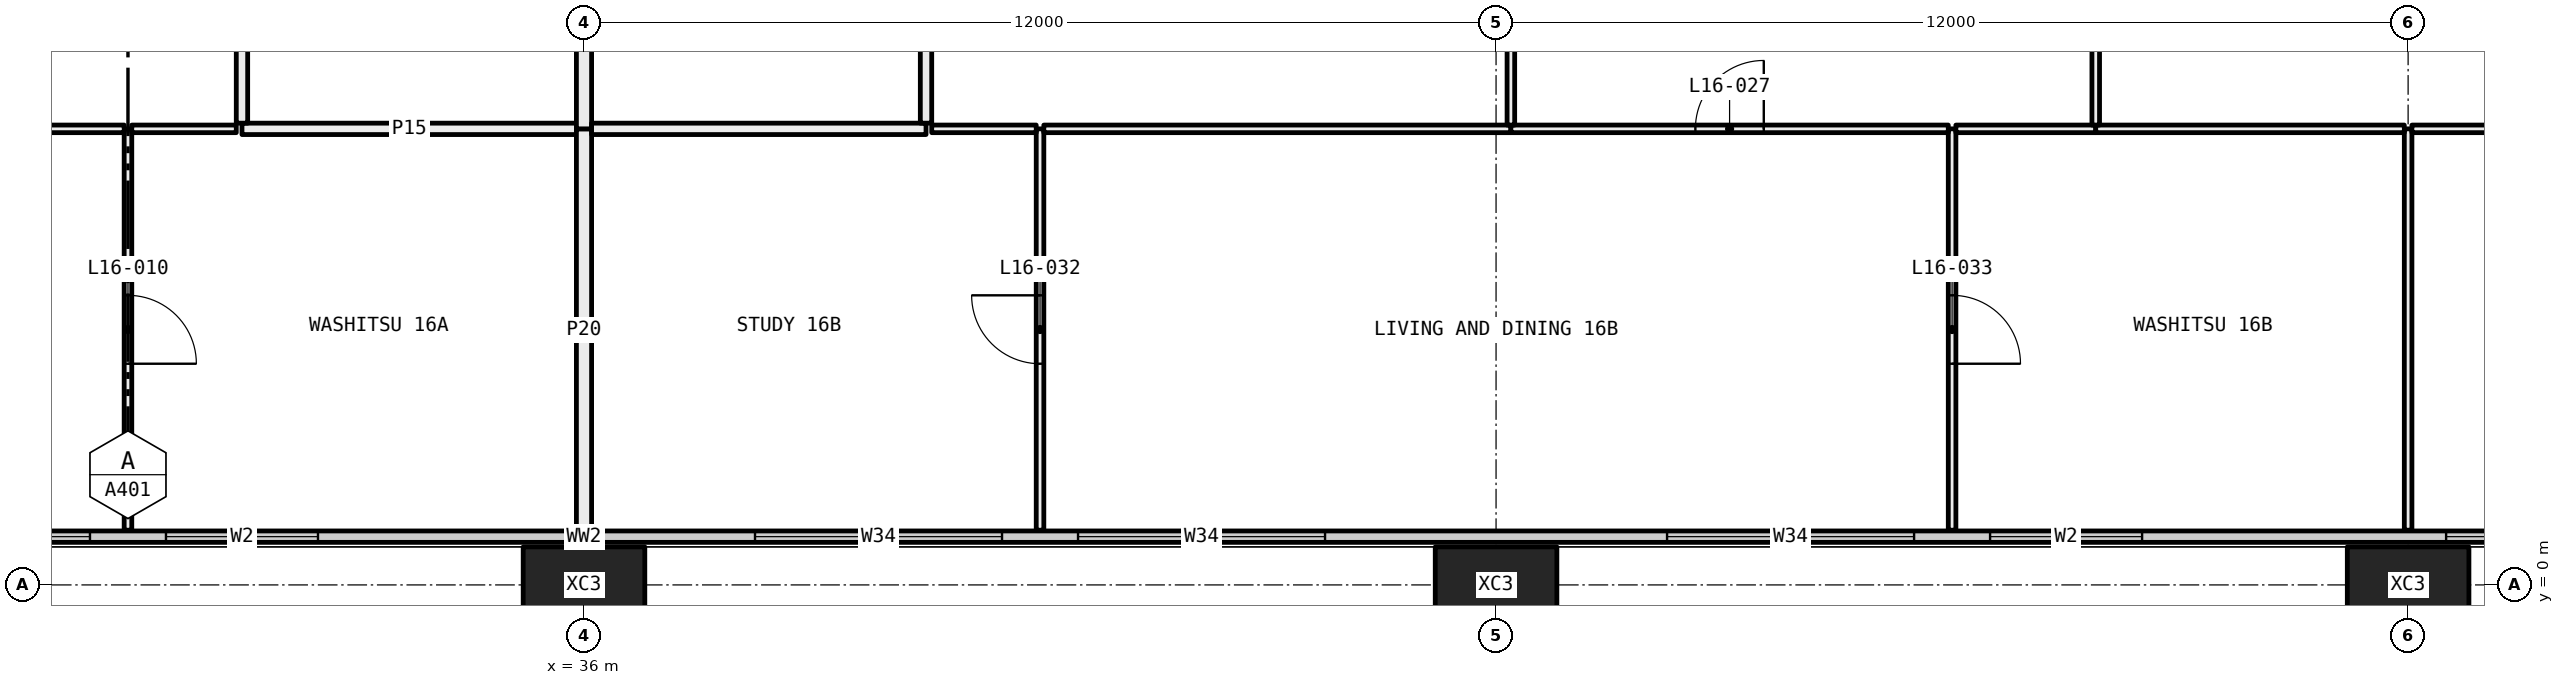
"""IFC4 building model, lengths in metres.
Left out: names, types, materials, properties, quantities, classifications, styles, units other than length and angle.
Written with IfcOpenShell. Run it as: python <this file> out.ifc"""

import sys

from ifc_helpers import new_model, si_unit, direction, frame, frame_2d, origin, origin_2d, place, context, subcontext, project, spatial, rectangle, hollow_rectangle, extrude, element, fill, save


model = new_model("IFC4")
c1 = context("Model", 3, precision=1e-05, world=origin(), true_north=direction((0.0, 1.0)))
c2 = subcontext(c1, "Body", "Model", "MODEL_VIEW")
j1 = project(units=[si_unit("LENGTHUNIT", "METRE"), si_unit("PLANEANGLEUNIT", "RADIAN")], contexts=[c1])
p1 = place(None, origin())
s1 = spatial("IfcSite", under=j1, at=p1, CompositionType="ELEMENT")
p2 = place(p1, origin())
s2 = spatial("IfcBuilding", under=s1, at=p2, CompositionType="ELEMENT")
p3 = place(p2, frame((0.0, 0.0, 67.95)))
s3 = spatial("IfcBuildingStorey", under=s2, at=p3, CompositionType="ELEMENT", Elevation=67.95)
for number, where, z_axis, x_axis in (
    (1, (36.0, 0.0, -0.4), (0.0, 0.0, 1.0), (1.0, 0.0, 0.0)),
    (2, (48.0, 0.0, -0.4), (0.0, 0.0, 1.0), (1.0, 0.0, 0.0)),
    (3, (60.0, 0.0, -0.4), (0.0, 0.0, 1.0), (1.0, 0.0, 0.0)),
):
    element("IfcColumn", number, at=place(p3, frame(where, z_axis=z_axis, x_axis=x_axis)), inside=s3, PredefinedType="COLUMN", context=c2, shape_type="SweptSolid", body=[
        extrude(hollow_rectangle(XDim=1.6, YDim=1.0, WallThickness=0.065, at=origin_2d()), origin(), (0.0, 0.0, 1.0), 3.45),
    ])
p4 = place(p3, frame((6.56, 0.635, 0.0), z_axis=(0.0, 0.0, 1.0), x_axis=(1.0, 0.0, 0.0)))
e4 = element("IfcWall", 4, at=p4, inside=s3, PredefinedType="ELEMENTEDWALL", context=c2, shape_type="SweptSolid", body=[
    extrude(rectangle(XDim=58.88, YDim=0.15, at=frame_2d((29.44, 0.0))), origin(), (0.0, 0.0, 1.0), 3.05),
])
p5 = place(p4, frame((0.44, 0.0, 0.45)))
e5 = element("IfcOpeningElement", 5, at=p5, cuts=e4, PredefinedType="OPENING", context=c2, shape_type="SweptSolid", body=[
    extrude(rectangle(XDim=4.5, YDim=2.55, at=frame_2d((2.25, 1.275))), frame((0.0, 0.085, 0.0), z_axis=(0.0, -1.0, 0.0), x_axis=(1.0, 0.0, 0.0)), (0.0, 0.0, 1.0), 0.17),
])
p6 = place(p4, frame((7.69, 0.0, 0.45)))
e6 = element("IfcOpeningElement", 6, at=p6, cuts=e4, PredefinedType="OPENING", context=c2, shape_type="SweptSolid", body=[
    extrude(rectangle(XDim=3.25, YDim=2.55, at=frame_2d((1.625, 1.275))), frame((0.0, 0.085, 0.0), z_axis=(0.0, -1.0, 0.0), x_axis=(1.0, 0.0, 0.0)), (0.0, 0.0, 1.0), 0.17),
])
p7 = place(p4, frame((11.94, 0.0, 0.45)))
e7 = element("IfcOpeningElement", 7, at=p7, cuts=e4, PredefinedType="OPENING", context=c2, shape_type="SweptSolid", body=[
    extrude(rectangle(XDim=3.25, YDim=2.55, at=frame_2d((1.625, 1.275))), frame((0.0, 0.085, 0.0), z_axis=(0.0, -1.0, 0.0), x_axis=(1.0, 0.0, 0.0)), (0.0, 0.0, 1.0), 0.17),
])
p8 = place(p4, frame((19.69, 0.0, 0.45)))
e8 = element("IfcOpeningElement", 8, at=p8, cuts=e4, PredefinedType="OPENING", context=c2, shape_type="SweptSolid", body=[
    extrude(rectangle(XDim=3.25, YDim=2.55, at=frame_2d((1.625, 1.275))), frame((0.0, 0.085, 0.0), z_axis=(0.0, -1.0, 0.0), x_axis=(1.0, 0.0, 0.0)), (0.0, 0.0, 1.0), 0.17),
])
p9 = place(p4, frame((23.94, 0.0, 0.45)))
e9 = element("IfcOpeningElement", 9, at=p9, cuts=e4, PredefinedType="OPENING", context=c2, shape_type="SweptSolid", body=[
    extrude(rectangle(XDim=2.0, YDim=2.55, at=frame_2d((1.0, 1.275))), frame((0.0, 0.085, 0.0), z_axis=(0.0, -1.0, 0.0), x_axis=(1.0, 0.0, 0.0)), (0.0, 0.0, 1.0), 0.17),
])
p10 = place(p4, frame((31.69, 0.0, 0.45)))
e10 = element("IfcOpeningElement", 10, at=p10, cuts=e4, PredefinedType="OPENING", context=c2, shape_type="SweptSolid", body=[
    extrude(rectangle(XDim=3.25, YDim=2.55, at=frame_2d((1.625, 1.275))), frame((0.0, 0.085, 0.0), z_axis=(0.0, -1.0, 0.0), x_axis=(1.0, 0.0, 0.0)), (0.0, 0.0, 1.0), 0.17),
])
p11 = place(p4, frame((35.94, 0.0, 0.45)))
e11 = element("IfcOpeningElement", 11, at=p11, cuts=e4, PredefinedType="OPENING", context=c2, shape_type="SweptSolid", body=[
    extrude(rectangle(XDim=3.25, YDim=2.55, at=frame_2d((1.625, 1.275))), frame((0.0, 0.085, 0.0), z_axis=(0.0, -1.0, 0.0), x_axis=(1.0, 0.0, 0.0)), (0.0, 0.0, 1.0), 0.17),
])
p12 = place(p4, frame((43.69, 0.0, 0.45)))
e12 = element("IfcOpeningElement", 12, at=p12, cuts=e4, PredefinedType="OPENING", context=c2, shape_type="SweptSolid", body=[
    extrude(rectangle(XDim=3.25, YDim=2.55, at=frame_2d((1.625, 1.275))), frame((0.0, 0.085, 0.0), z_axis=(0.0, -1.0, 0.0), x_axis=(1.0, 0.0, 0.0)), (0.0, 0.0, 1.0), 0.17),
])
p13 = place(p4, frame((47.94, 0.0, 0.45)))
e13 = element("IfcOpeningElement", 13, at=p13, cuts=e4, PredefinedType="OPENING", context=c2, shape_type="SweptSolid", body=[
    extrude(rectangle(XDim=2.0, YDim=2.55, at=frame_2d((1.0, 1.275))), frame((0.0, 0.085, 0.0), z_axis=(0.0, -1.0, 0.0), x_axis=(1.0, 0.0, 0.0)), (0.0, 0.0, 1.0), 0.17),
])
p14 = place(p4, frame((53.94, 0.0, 0.45)))
e14 = element("IfcOpeningElement", 14, at=p14, cuts=e4, PredefinedType="OPENING", context=c2, shape_type="SweptSolid", body=[
    extrude(rectangle(XDim=4.5, YDim=2.55, at=frame_2d((2.25, 1.275))), frame((0.0, 0.085, 0.0), z_axis=(0.0, -1.0, 0.0), x_axis=(1.0, 0.0, 0.0)), (0.0, 0.0, 1.0), 0.17),
])
p15 = place(p3, frame((30.0, 0.72, 0.0), z_axis=(0.0, 0.0, 1.0), x_axis=(0.0, 1.0, 0.0)))
e15 = element("IfcWall", 15, at=p15, inside=s3, PredefinedType="PARTITIONING", context=c2, shape_type="SweptSolid", body=[
    extrude(rectangle(XDim=5.28, YDim=0.1, at=frame_2d((2.64, 0.0))), origin(), (0.0, 0.0, 1.0), 3.05),
])
p16 = place(p15, frame((2.19, 0.0, 0.0)))
e16 = element("IfcOpeningElement", 16, at=p16, cuts=e15, PredefinedType="OPENING", context=c2, shape_type="SweptSolid", body=[
    extrude(rectangle(XDim=0.9, YDim=2.1, at=frame_2d((0.45, 1.05))), frame((0.0, 0.06, 0.0), z_axis=(0.0, -1.0, 0.0), x_axis=(1.0, 0.0, 0.0)), (0.0, 0.0, 1.0), 0.12),
])
p17 = place(p3, frame((29.95, 6.0, 0.0), z_axis=(0.0, 0.0, 1.0), x_axis=(-1.0, 0.0, 0.0)))
e17 = element("IfcWall", 17, at=p17, inside=s3, PredefinedType="PARTITIONING", context=c2, shape_type="SweptSolid", body=[
    extrude(rectangle(XDim=6.145, YDim=0.1, at=frame_2d((3.073, 0.0))), origin(), (0.0, 0.0, 1.0), 2.45),
])
p18 = place(p3, frame((31.425, 6.0, 0.0), z_axis=(0.0, 0.0, 1.0), x_axis=(-1.0, 0.0, 0.0)))
e18 = element("IfcWall", 18, at=p18, inside=s3, PredefinedType="PARTITIONING", context=c2, shape_type="SweptSolid", body=[
    extrude(rectangle(XDim=1.375, YDim=0.1, at=frame_2d((0.688, 0.0))), origin(), (0.0, 0.0, 1.0), 3.05),
])
p19 = place(p3, frame((35.9, 6.0, 0.0), z_axis=(0.0, 0.0, 1.0), x_axis=(-1.0, 0.0, 0.0)))
e19 = element("IfcWall", 19, at=p19, inside=s3, PredefinedType="PARTITIONING", context=c2, shape_type="SweptSolid", body=[
    extrude(rectangle(XDim=4.4, YDim=0.15, at=frame_2d((2.2, 0.0))), origin(), (0.0, 0.0, 1.0), 3.05),
])
p20 = place(p3, frame((36.0, 0.72, 0.0), z_axis=(0.0, 0.0, 1.0), x_axis=(0.0, 1.0, 0.0)))
e20 = element("IfcWall", 20, at=p20, inside=s3, PredefinedType="PARTITIONING", context=c2, shape_type="SweptSolid", body=[
    extrude(rectangle(XDim=5.28, YDim=0.2, at=frame_2d((2.64, 0.0))), origin(), (0.0, 0.0, 1.0), 2.45),
])
p21 = place(p3, frame((31.5, 6.075, 0.0), z_axis=(0.0, 0.0, 1.0), x_axis=(0.0, 1.0, 0.0)))
e21 = element("IfcWall", 21, at=p21, inside=s3, PredefinedType="PARTITIONING", context=c2, shape_type="SweptSolid", body=[
    extrude(rectangle(XDim=2.925, YDim=0.15, at=frame_2d((1.462, 0.0))), origin(), (0.0, 0.0, 1.0), 3.05),
])
p22 = place(p21, frame((1.012, 0.0, 0.0)))
e22 = element("IfcOpeningElement", 22, at=p22, cuts=e21, PredefinedType="OPENING", context=c2, shape_type="SweptSolid", body=[
    extrude(rectangle(XDim=0.9, YDim=2.1, at=frame_2d((0.45, 1.05))), frame((0.0, 0.085, 0.0), z_axis=(0.0, -1.0, 0.0), x_axis=(1.0, 0.0, 0.0)), (0.0, 0.0, 1.0), 0.17),
])
p23 = place(p3, frame((36.0, 6.0, 0.0), z_axis=(0.0, 0.0, 1.0), x_axis=(0.0, 1.0, 0.0)))
e23 = element("IfcWall", 23, at=p23, inside=s3, PredefinedType="PARTITIONING", context=c2, shape_type="SweptSolid", body=[
    extrude(rectangle(XDim=3.0, YDim=0.2, at=frame_2d((1.5, 0.0))), origin(), (0.0, 0.0, 1.0), 2.45),
])
p24 = place(p3, frame((42.0, 0.72, 0.0), z_axis=(0.0, 0.0, 1.0), x_axis=(0.0, 1.0, 0.0)))
e24 = element("IfcWall", 24, at=p24, inside=s3, PredefinedType="PARTITIONING", context=c2, shape_type="SweptSolid", body=[
    extrude(rectangle(XDim=5.28, YDim=0.1, at=frame_2d((2.64, 0.0))), origin(), (0.0, 0.0, 1.0), 3.05),
])
p25 = place(p24, frame((2.19, 0.0, 0.0)))
e25 = element("IfcOpeningElement", 25, at=p25, cuts=e24, PredefinedType="OPENING", context=c2, shape_type="SweptSolid", body=[
    extrude(rectangle(XDim=0.9, YDim=2.1, at=frame_2d((0.45, 1.05))), frame((0.0, 0.06, 0.0), z_axis=(0.0, -1.0, 0.0), x_axis=(1.0, 0.0, 0.0)), (0.0, 0.0, 1.0), 0.12),
])
p26 = place(p3, frame((40.5, 6.0, 0.0), z_axis=(0.0, 0.0, 1.0), x_axis=(-1.0, 0.0, 0.0)))
e26 = element("IfcWall", 26, at=p26, inside=s3, PredefinedType="PARTITIONING", context=c2, shape_type="SweptSolid", body=[
    extrude(rectangle(XDim=4.4, YDim=0.15, at=frame_2d((2.2, 0.0))), origin(), (0.0, 0.0, 1.0), 3.05),
])
p27 = place(p3, frame((41.95, 6.0, 0.0), z_axis=(0.0, 0.0, 1.0), x_axis=(-1.0, 0.0, 0.0)))
e27 = element("IfcWall", 27, at=p27, inside=s3, PredefinedType="PARTITIONING", context=c2, shape_type="SweptSolid", body=[
    extrude(rectangle(XDim=1.375, YDim=0.1, at=frame_2d((0.688, 0.0))), origin(), (0.0, 0.0, 1.0), 3.05),
])
p28 = place(p3, frame((54.0, 0.72, 0.0), z_axis=(0.0, 0.0, 1.0), x_axis=(0.0, 1.0, 0.0)))
e28 = element("IfcWall", 28, at=p28, inside=s3, PredefinedType="PARTITIONING", context=c2, shape_type="SweptSolid", body=[
    extrude(rectangle(XDim=5.28, YDim=0.1, at=frame_2d((2.64, 0.0))), origin(), (0.0, 0.0, 1.0), 3.05),
])
p29 = place(p28, frame((2.19, 0.0, 0.0)))
e29 = element("IfcOpeningElement", 29, at=p29, cuts=e28, PredefinedType="OPENING", context=c2, shape_type="SweptSolid", body=[
    extrude(rectangle(XDim=0.9, YDim=2.1, at=frame_2d((0.45, 1.05))), frame((0.0, 0.06, 0.0), z_axis=(0.0, -1.0, 0.0), x_axis=(1.0, 0.0, 0.0)), (0.0, 0.0, 1.0), 0.12),
])
p30 = place(p3, frame((48.195, 6.0, 0.0), z_axis=(0.0, 0.0, 1.0), x_axis=(-1.0, 0.0, 0.0)))
e30 = element("IfcWall", 30, at=p30, inside=s3, PredefinedType="PARTITIONING", context=c2, shape_type="SweptSolid", body=[
    extrude(rectangle(XDim=6.145, YDim=0.1, at=frame_2d((3.073, 0.0))), origin(), (0.0, 0.0, 1.0), 2.45),
])
p31 = place(p3, frame((53.95, 6.0, 0.0), z_axis=(0.0, 0.0, 1.0), x_axis=(-1.0, 0.0, 0.0)))
e31 = element("IfcWall", 31, at=p31, inside=s3, PredefinedType="PARTITIONING", context=c2, shape_type="SweptSolid", body=[
    extrude(rectangle(XDim=5.755, YDim=0.1, at=frame_2d((2.877, 0.0))), origin(), (0.0, 0.0, 1.0), 3.05),
])
p32 = place(p31, frame((2.427, 0.0, 0.0)))
e32 = element("IfcOpeningElement", 32, at=p32, cuts=e31, PredefinedType="OPENING", context=c2, shape_type="SweptSolid", body=[
    extrude(rectangle(XDim=0.9, YDim=2.1, at=frame_2d((0.45, 1.05))), frame((0.0, 0.06, 0.0), z_axis=(0.0, -1.0, 0.0), x_axis=(1.0, 0.0, 0.0)), (0.0, 0.0, 1.0), 0.12),
])
p33 = place(p3, frame((60.0, 0.72, 0.0), z_axis=(0.0, 0.0, 1.0), x_axis=(0.0, 1.0, 0.0)))
e33 = element("IfcWall", 33, at=p33, inside=s3, PredefinedType="PARTITIONING", context=c2, shape_type="SweptSolid", body=[
    extrude(rectangle(XDim=5.28, YDim=0.1, at=frame_2d((2.64, 0.0))), origin(), (0.0, 0.0, 1.0), 2.45),
])
p34 = place(p3, frame((55.89, 6.0, 0.0), z_axis=(0.0, 0.0, 1.0), x_axis=(-1.0, 0.0, 0.0)))
e34 = element("IfcWall", 34, at=p34, inside=s3, PredefinedType="PARTITIONING", context=c2, shape_type="SweptSolid", body=[
    extrude(rectangle(XDim=1.84, YDim=0.1, at=frame_2d((0.92, 0.0))), origin(), (0.0, 0.0, 1.0), 3.05),
])
p35 = place(p3, frame((59.95, 6.0, 0.0), z_axis=(0.0, 0.0, 1.0), x_axis=(-1.0, 0.0, 0.0)))
e35 = element("IfcWall", 35, at=p35, inside=s3, PredefinedType="PARTITIONING", context=c2, shape_type="SweptSolid", body=[
    extrude(rectangle(XDim=4.06, YDim=0.1, at=frame_2d((2.03, 0.0))), origin(), (0.0, 0.0, 1.0), 2.45),
])
p36 = place(p3, frame((63.585, 6.0, 0.0), z_axis=(0.0, 0.0, 1.0), x_axis=(-1.0, 0.0, 0.0)))
e36 = element("IfcWall", 36, at=p36, inside=s3, PredefinedType="PARTITIONING", context=c2, shape_type="SweptSolid", body=[
    extrude(rectangle(XDim=3.535, YDim=0.1, at=frame_2d((1.768, 0.0))), origin(), (0.0, 0.0, 1.0), 2.45),
])
p37 = place(p36, frame((1.317, 0.0, 0.0)))
e37 = element("IfcOpeningElement", 37, at=p37, cuts=e36, PredefinedType="OPENING", context=c2, shape_type="SweptSolid", body=[
    extrude(rectangle(XDim=0.9, YDim=2.1, at=frame_2d((0.45, 1.05))), frame((0.0, 0.06, 0.0), z_axis=(0.0, -1.0, 0.0), x_axis=(1.0, 0.0, 0.0)), (0.0, 0.0, 1.0), 0.12),
])
p38 = place(p3, frame((40.5, 6.075, 0.0), z_axis=(0.0, 0.0, 1.0), x_axis=(0.0, 1.0, 0.0)))
e38 = element("IfcWall", 38, at=p38, inside=s3, PredefinedType="PARTITIONING", context=c2, shape_type="SweptSolid", body=[
    extrude(rectangle(XDim=2.85, YDim=0.15, at=frame_2d((1.425, 0.0))), origin(), (0.0, 0.0, 1.0), 3.05),
])
p39 = place(p38, frame((0.975, 0.0, 0.0)))
e39 = element("IfcOpeningElement", 39, at=p39, cuts=e38, PredefinedType="OPENING", context=c2, shape_type="SweptSolid", body=[
    extrude(rectangle(XDim=0.9, YDim=2.1, at=frame_2d((0.45, 1.05))), frame((0.0, 0.085, 0.0), z_axis=(0.0, -1.0, 0.0), x_axis=(1.0, 0.0, 0.0)), (0.0, 0.0, 1.0), 0.17),
])
p40 = place(p3, frame((48.195, 6.05, 0.0), z_axis=(0.0, 0.0, 1.0), x_axis=(0.0, 1.0, 0.0)))
e40 = element("IfcWall", 40, at=p40, inside=s3, PredefinedType="PARTITIONING", context=c2, shape_type="SweptSolid", body=[
    extrude(rectangle(XDim=5.15, YDim=0.1, at=frame_2d((2.575, 0.0))), origin(), (0.0, 0.0, 1.0), 3.05),
])
p41 = place(p40, frame((2.125, 0.0, 0.0)))
e41 = element("IfcOpeningElement", 41, at=p41, cuts=e40, PredefinedType="OPENING", context=c2, shape_type="SweptSolid", body=[
    extrude(rectangle(XDim=0.9, YDim=2.1, at=frame_2d((0.45, 1.05))), frame((0.0, 0.06, 0.0), z_axis=(0.0, -1.0, 0.0), x_axis=(1.0, 0.0, 0.0)), (0.0, 0.0, 1.0), 0.12),
])
p42 = place(p3, frame((55.89, 6.05, 0.0), z_axis=(0.0, 0.0, 1.0), x_axis=(0.0, 1.0, 0.0)))
e42 = element("IfcWall", 42, at=p42, inside=s3, PredefinedType="PARTITIONING", context=c2, shape_type="SweptSolid", body=[
    extrude(rectangle(XDim=5.95, YDim=0.1, at=frame_2d((2.975, 0.0))), origin(), (0.0, 0.0, 1.0), 2.45),
])
p43 = place(p42, frame((2.525, 0.0, 0.0)))
e43 = element("IfcOpeningElement", 43, at=p43, cuts=e42, PredefinedType="OPENING", context=c2, shape_type="SweptSolid", body=[
    extrude(rectangle(XDim=0.9, YDim=2.1, at=frame_2d((0.45, 1.05))), frame((0.0, 0.06, 0.0), z_axis=(0.0, -1.0, 0.0), x_axis=(1.0, 0.0, 0.0)), (0.0, 0.0, 1.0), 0.12),
])
p44 = place(p8, origin())
e44 = element("IfcWindow", 44, at=p44, inside=s3, PartitioningType="SINGLE_PANEL", PredefinedType="WINDOW", context=c2, shape_type="SweptSolid", body=[
    extrude(rectangle(XDim=3.25, YDim=2.55, at=frame_2d((1.625, 1.275))), frame((0.0, 0.03, 0.0), z_axis=(0.0, -1.0, 0.0), x_axis=(1.0, 0.0, 0.0)), (0.0, 0.0, 1.0), 0.06),
])
fill(e8, e44)
p45 = place(p9, origin())
e45 = element("IfcWindow", 45, at=p45, inside=s3, PartitioningType="SINGLE_PANEL", PredefinedType="WINDOW", context=c2, shape_type="SweptSolid", body=[
    extrude(rectangle(XDim=2.0, YDim=2.55, at=frame_2d((1.0, 1.275))), frame((0.0, 0.03, 0.0), z_axis=(0.0, -1.0, 0.0), x_axis=(1.0, 0.0, 0.0)), (0.0, 0.0, 1.0), 0.06),
])
fill(e9, e45)
p46 = place(p10, origin())
e46 = element("IfcWindow", 46, at=p46, inside=s3, PartitioningType="SINGLE_PANEL", PredefinedType="WINDOW", context=c2, shape_type="SweptSolid", body=[
    extrude(rectangle(XDim=3.25, YDim=2.55, at=frame_2d((1.625, 1.275))), frame((0.0, 0.03, 0.0), z_axis=(0.0, -1.0, 0.0), x_axis=(1.0, 0.0, 0.0)), (0.0, 0.0, 1.0), 0.06),
])
fill(e10, e46)
p47 = place(p11, origin())
e47 = element("IfcWindow", 47, at=p47, inside=s3, PartitioningType="SINGLE_PANEL", PredefinedType="WINDOW", context=c2, shape_type="SweptSolid", body=[
    extrude(rectangle(XDim=3.25, YDim=2.55, at=frame_2d((1.625, 1.275))), frame((0.0, 0.03, 0.0), z_axis=(0.0, -1.0, 0.0), x_axis=(1.0, 0.0, 0.0)), (0.0, 0.0, 1.0), 0.06),
])
fill(e11, e47)
p48 = place(p12, origin())
e48 = element("IfcWindow", 48, at=p48, inside=s3, PartitioningType="SINGLE_PANEL", PredefinedType="WINDOW", context=c2, shape_type="SweptSolid", body=[
    extrude(rectangle(XDim=3.25, YDim=2.55, at=frame_2d((1.625, 1.275))), frame((0.0, 0.03, 0.0), z_axis=(0.0, -1.0, 0.0), x_axis=(1.0, 0.0, 0.0)), (0.0, 0.0, 1.0), 0.06),
])
fill(e12, e48)
p49 = place(p13, origin())
e49 = element("IfcWindow", 49, at=p49, inside=s3, PartitioningType="SINGLE_PANEL", PredefinedType="WINDOW", context=c2, shape_type="SweptSolid", body=[
    extrude(rectangle(XDim=2.0, YDim=2.55, at=frame_2d((1.0, 1.275))), frame((0.0, 0.03, 0.0), z_axis=(0.0, -1.0, 0.0), x_axis=(1.0, 0.0, 0.0)), (0.0, 0.0, 1.0), 0.06),
])
fill(e13, e49)
p50 = place(p14, origin())
e50 = element("IfcWindow", 50, at=p50, inside=s3, PartitioningType="SINGLE_PANEL", PredefinedType="WINDOW", context=c2, shape_type="SweptSolid", body=[
    extrude(rectangle(XDim=4.5, YDim=2.55, at=frame_2d((2.25, 1.275))), frame((0.0, 0.03, 0.0), z_axis=(0.0, -1.0, 0.0), x_axis=(1.0, 0.0, 0.0)), (0.0, 0.0, 1.0), 0.06),
])
fill(e14, e50)
p51 = place(p16, frame((0.9, 0.0, 0.0), x_axis=(-1.0, 0.0, 0.0)))
e51 = element("IfcDoor", 51, at=p51, inside=s3, OperationType="SINGLE_SWING_LEFT", PredefinedType="DOOR", context=c2, shape_type="SweptSolid", body=[
    extrude(rectangle(XDim=0.9, YDim=2.1, at=frame_2d((0.45, 1.05))), frame((0.0, 0.025, 0.0), z_axis=(0.0, -1.0, 0.0), x_axis=(1.0, 0.0, 0.0)), (0.0, 0.0, 1.0), 0.05),
])
fill(e16, e51)
p52 = place(p32, frame((0.9, 0.0, 0.0), x_axis=(-1.0, 0.0, 0.0)))
e52 = element("IfcDoor", 52, at=p52, inside=s3, OperationType="SINGLE_SWING_LEFT", PredefinedType="DOOR", context=c2, shape_type="SweptSolid", body=[
    extrude(rectangle(XDim=0.9, YDim=2.1, at=frame_2d((0.45, 1.05))), frame((0.0, 0.025, 0.0), z_axis=(0.0, -1.0, 0.0), x_axis=(1.0, 0.0, 0.0)), (0.0, 0.0, 1.0), 0.05),
])
fill(e32, e52)
p53 = place(p25, origin())
e53 = element("IfcDoor", 53, at=p53, inside=s3, OperationType="SINGLE_SWING_LEFT", PredefinedType="DOOR", context=c2, shape_type="SweptSolid", body=[
    extrude(rectangle(XDim=0.9, YDim=2.1, at=frame_2d((0.45, 1.05))), frame((0.0, 0.025, 0.0), z_axis=(0.0, -1.0, 0.0), x_axis=(1.0, 0.0, 0.0)), (0.0, 0.0, 1.0), 0.05),
])
fill(e25, e53)
p54 = place(p29, frame((0.9, 0.0, 0.0), x_axis=(-1.0, 0.0, 0.0)))
e54 = element("IfcDoor", 54, at=p54, inside=s3, OperationType="SINGLE_SWING_LEFT", PredefinedType="DOOR", context=c2, shape_type="SweptSolid", body=[
    extrude(rectangle(XDim=0.9, YDim=2.1, at=frame_2d((0.45, 1.05))), frame((0.0, 0.025, 0.0), z_axis=(0.0, -1.0, 0.0), x_axis=(1.0, 0.0, 0.0)), (0.0, 0.0, 1.0), 0.05),
])
fill(e29, e54)
save(model, sys.argv[1])
